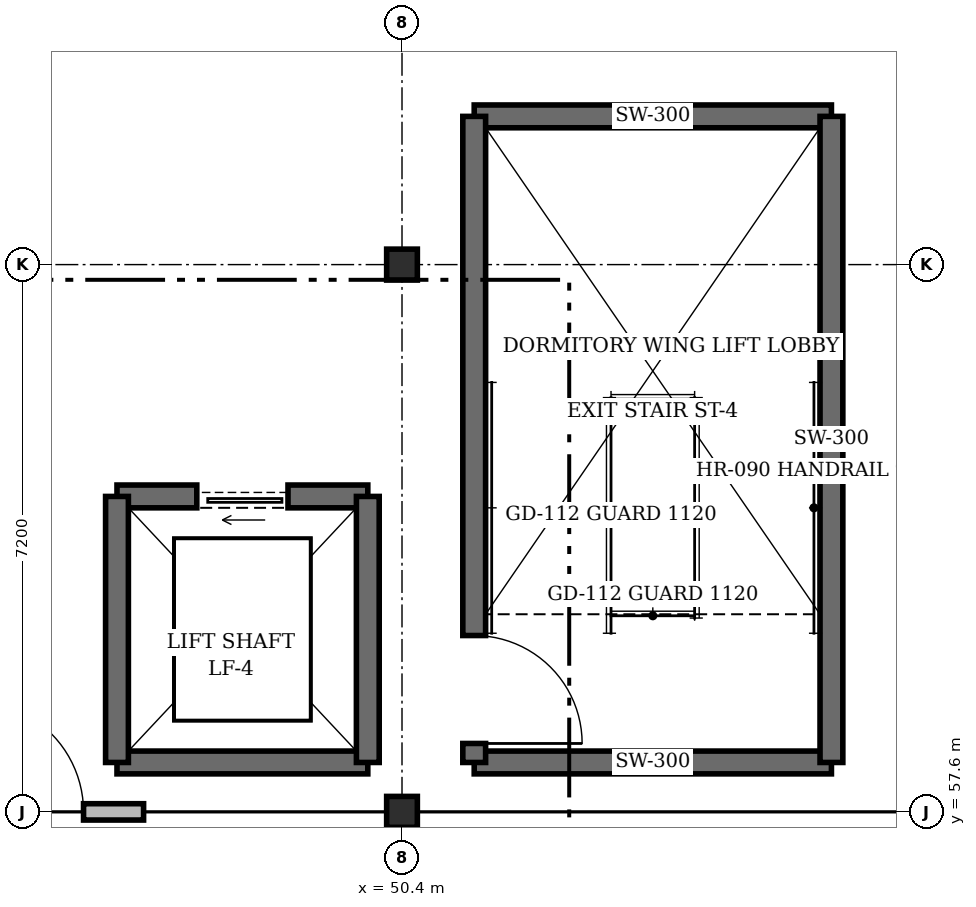
"""IFC4 building model, lengths in metres.
Left out: names, types, materials, properties, quantities, classifications, styles, units other than length and angle.
Written with IfcOpenShell. Run it as: python <this file> out.ifc"""

import sys

from ifc_helpers import new_model, si_unit, direction, frame, frame_2d, origin, origin_2d, place, context, subcontext, project, spatial, rectangle, i_section, extrude, element, fill, save


model = new_model("IFC4")
c1 = context("Model", 3, precision=1e-05, world=origin(), true_north=direction((0.0, 1.0)))
c2 = subcontext(c1, "Body", "Model", "MODEL_VIEW")
j1 = project(units=[si_unit("LENGTHUNIT", "METRE"), si_unit("PLANEANGLEUNIT", "RADIAN")], contexts=[c1])
p1 = place(None, origin())
s1 = spatial("IfcSite", under=j1, at=p1, CompositionType="ELEMENT")
p2 = place(p1, origin())
s2 = spatial("IfcBuilding", under=s1, at=p2, CompositionType="ELEMENT")
p3 = place(p2, frame((0.0, 0.0, 10.2)))
s3 = spatial("IfcBuildingStorey", under=s2, at=p3, CompositionType="ELEMENT", Elevation=10.2)
for number, where, z_axis, x_axis in (
    (1, (50.4, 57.6, 0.0), (0.0, 0.0, 1.0), (1.0, 0.0, 0.0)),
    (2, (50.4, 64.8, 0.0), (0.0, 0.0, 1.0), (1.0, 0.0, 0.0)),
):
    element("IfcColumn", number, at=place(p3, frame(where, z_axis=z_axis, x_axis=x_axis)), inside=s3, PredefinedType="COLUMN", context=c2, shape_type="SweptSolid", body=[
        extrude(i_section(OverallWidth=0.404, OverallDepth=0.407, WebThickness=0.027, FlangeThickness=0.044, at=origin_2d()), origin(), (0.0, 0.0, 1.0), 4.2),
    ])
for number, where, z_axis, x_axis in (
    (3, (51.35, 58.25, 0.0), (0.0, 0.0, 1.0), (1.0, 0.0, 0.0)),
    (4, (56.05, 66.75, 0.0), (0.0, 0.0, 1.0), (-1.0, 0.0, 0.0)),
):
    element("IfcWall", number, at=place(p3, frame(where, z_axis=z_axis, x_axis=x_axis)), inside=s3, PredefinedType="SHEAR", context=c2, shape_type="SweptSolid", body=[
        extrude(rectangle(XDim=4.7, YDim=0.3, at=frame_2d((2.35, 0.0))), origin(), (0.0, 0.0, 1.0), 3.95),
    ])
p4 = place(p3, frame((51.35, 66.75, 0.0), z_axis=(0.0, 0.0, 1.0), x_axis=(0.0, -1.0, 0.0)))
e5 = element("IfcWall", 5, at=p4, inside=s3, PredefinedType="SHEAR", context=c2, shape_type="SweptSolid", body=[
    extrude(rectangle(XDim=8.5, YDim=0.3, at=frame_2d((4.25, 0.0))), origin(), (0.0, 0.0, 1.0), 3.95),
])
p5 = place(p4, frame((6.83, 0.0, 0.0)))
e6 = element("IfcOpeningElement", 6, at=p5, cuts=e5, PredefinedType="OPENING", context=c2, shape_type="SweptSolid", body=[
    extrude(rectangle(XDim=1.42, YDim=2.22, at=frame_2d((0.71, 1.11))), frame((0.0, 0.16, 0.0), z_axis=(0.0, -1.0, 0.0), x_axis=(1.0, 0.0, 0.0)), (0.0, 0.0, 1.0), 0.32),
])
p6 = place(p3, frame((56.05, 58.25, 0.0), z_axis=(0.0, 0.0, 1.0), x_axis=(0.0, 1.0, 0.0)))
e7 = element("IfcWall", 7, at=p6, inside=s3, PredefinedType="SHEAR", context=c2, shape_type="SweptSolid", body=[
    extrude(rectangle(XDim=8.5, YDim=0.3, at=frame_2d((4.25, 0.0))), origin(), (0.0, 0.0, 1.0), 3.95),
])
p7 = place(p3, frame((46.65, 58.25, 0.0), z_axis=(0.0, 0.0, 1.0), x_axis=(1.0, 0.0, 0.0)))
e8 = element("IfcWall", 8, at=p7, inside=s3, PredefinedType="SHEAR", context=c2, shape_type="SweptSolid", body=[
    extrude(rectangle(XDim=3.3, YDim=0.3, at=frame_2d((1.65, 0.0))), origin(), (0.0, 0.0, 1.0), 3.95),
])
p8 = place(p3, frame((49.95, 61.75, 0.0), z_axis=(0.0, 0.0, 1.0), x_axis=(-1.0, 0.0, 0.0)))
e9 = element("IfcWall", 9, at=p8, inside=s3, PredefinedType="SHEAR", context=c2, shape_type="SweptSolid", body=[
    extrude(rectangle(XDim=3.3, YDim=0.3, at=frame_2d((1.65, 0.0))), origin(), (0.0, 0.0, 1.0), 3.95),
])
p9 = place(p8, frame((1.05, 0.0, 0.0)))
e10 = element("IfcOpeningElement", 10, at=p9, cuts=e9, PredefinedType="OPENING", context=c2, shape_type="SweptSolid", body=[
    extrude(rectangle(XDim=1.2, YDim=2.26, at=frame_2d((0.6, 1.13))), frame((0.0, 0.16, 0.0), z_axis=(0.0, -1.0, 0.0), x_axis=(1.0, 0.0, 0.0)), (0.0, 0.0, 1.0), 0.32),
])
for number, where, z_axis, x_axis in (
    (11, (46.65, 61.75, 0.0), (0.0, 0.0, 1.0), (0.0, -1.0, 0.0)),
    (12, (49.95, 58.25, 0.0), (0.0, 0.0, 1.0), (0.0, 1.0, 0.0)),
):
    element("IfcWall", number, at=place(p3, frame(where, z_axis=z_axis, x_axis=x_axis)), inside=s3, PredefinedType="SHEAR", context=c2, shape_type="SweptSolid", body=[
        extrude(rectangle(XDim=3.5, YDim=0.3, at=frame_2d((1.75, 0.0))), origin(), (0.0, 0.0, 1.0), 3.95),
    ])
p10 = place(p3, frame((38.2, 57.6, 0.0), z_axis=(0.0, 0.0, 1.0), x_axis=(1.0, 0.0, 0.0)))
e13 = element("IfcWall", 13, at=p10, inside=s3, PredefinedType="STANDARD", context=c2, shape_type="SweptSolid", body=[
    extrude(rectangle(XDim=8.8, YDim=0.215, at=frame_2d((4.4, 0.0))), origin(), (0.0, 0.0, 1.0), 3.038),
])
p11 = place(p10, frame((6.55, 0.0, 0.0)))
e14 = element("IfcOpeningElement", 14, at=p11, cuts=e13, PredefinedType="OPENING", context=c2, shape_type="SweptSolid", body=[
    extrude(rectangle(XDim=1.46, YDim=2.26, at=frame_2d((0.73, 1.13))), frame((0.0, 0.117, 0.0), z_axis=(0.0, -1.0, 0.0), x_axis=(1.0, 0.0, 0.0)), (0.0, 0.0, 1.0), 0.235),
])
p12 = place(p5, origin())
e15 = element("IfcDoor", 15, at=p12, inside=s3, OperationType="SINGLE_SWING_RIGHT", PredefinedType="DOOR", context=c2, shape_type="SweptSolid", body=[
    extrude(rectangle(XDim=1.42, YDim=2.22, at=frame_2d((0.71, 1.11))), frame((0.0, 0.025, 0.0), z_axis=(0.0, -1.0, 0.0), x_axis=(1.0, 0.0, 0.0)), (0.0, 0.0, 1.0), 0.05),
])
fill(e6, e15)
p13 = place(p9, origin())
e16 = element("IfcDoor", 16, at=p13, inside=s3, OperationType="SLIDING_TO_LEFT", PredefinedType="DOOR", context=c2, shape_type="SweptSolid", body=[
    extrude(rectangle(XDim=1.2, YDim=2.26, at=frame_2d((0.6, 1.13))), frame((0.0, 0.025, 0.0), z_axis=(0.0, -1.0, 0.0), x_axis=(1.0, 0.0, 0.0)), (0.0, 0.0, 1.0), 0.05),
])
fill(e10, e16)
p14 = place(p11, origin())
e17 = element("IfcDoor", 17, at=p14, inside=s3, OperationType="SINGLE_SWING_LEFT", PredefinedType="DOOR", context=c2, shape_type="SweptSolid", body=[
    extrude(rectangle(XDim=1.46, YDim=2.26, at=frame_2d((0.73, 1.13))), frame((0.0, 0.025, 0.0), z_axis=(0.0, -1.0, 0.0), x_axis=(1.0, 0.0, 0.0)), (0.0, 0.0, 1.0), 0.05),
])
fill(e14, e17)
save(model, sys.argv[1])
